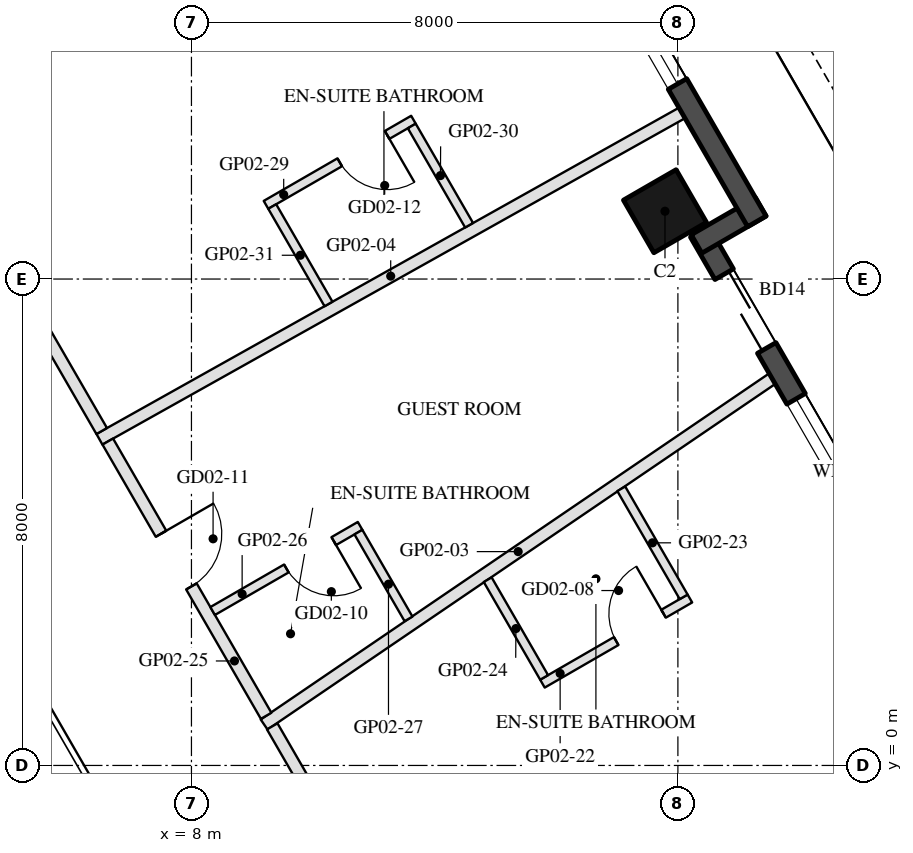
"""IFC4 building model, lengths in metres.
Left out: names, types, materials, properties, quantities, classifications, styles, units other than length and angle.
Written with IfcOpenShell. Run it as: python <this file> out.ifc"""

import sys

from ifc_helpers import new_model, si_unit, direction, frame, frame_2d, origin, origin_2d, place, context, subcontext, project, spatial, rectangle, hollow_rectangle, extrude, element, fill, save


model = new_model("IFC4")
c1 = context("Model", 3, precision=1e-05, world=origin(), true_north=direction((0.0, 1.0)))
c2 = subcontext(c1, "Body", "Model", "MODEL_VIEW")
j1 = project(units=[si_unit("LENGTHUNIT", "METRE"), si_unit("PLANEANGLEUNIT", "RADIAN")], contexts=[c1])
p1 = place(None, origin())
s1 = spatial("IfcSite", under=j1, at=p1, CompositionType="ELEMENT")
p2 = place(p1, origin())
s2 = spatial("IfcBuilding", under=s1, at=p2, CompositionType="ELEMENT")
p3 = place(p2, frame((0.0, 0.0, 53.9)))
s3 = spatial("IfcBuildingStorey", under=s2, at=p3, CompositionType="ELEMENT", Elevation=53.9)
p4 = place(p3, frame((15.788, 9.115, 0.0), z_axis=(0.0, 0.0, 1.0), x_axis=(-0.5, 0.866025403784, 0.0)))
e1 = element("IfcColumn", 1, at=p4, inside=s3, PredefinedType="COLUMN", context=c2, shape_type="SweptSolid", body=[
    extrude(hollow_rectangle(XDim=1.0, YDim=1.0, WallThickness=0.045, at=origin_2d()), origin(), (0.0, 0.0, 1.0), 3.7),
])
p5 = place(p3, frame((19.729, 2.938, 0.0), z_axis=(0.0, 0.0, 1.0), x_axis=(-0.499976430342, 0.866039011305, 0.0)))
e2 = element("IfcWall", 2, at=p5, inside=s3, PredefinedType="SOLIDWALL", context=c2, shape_type="SweptSolid", body=[
    extrude(rectangle(XDim=6.74, YDim=0.35, at=frame_2d((3.37, 0.0))), origin(), (0.0, 0.0, 1.0), 3.55),
])
p6 = place(p5, frame((0.77, 0.0, 0.3)))
e3 = element("IfcOpeningElement", 3, at=p6, cuts=e2, PredefinedType="OPENING", context=c2, shape_type="SweptSolid", body=[
    extrude(rectangle(XDim=2.8, YDim=2.65, at=frame_2d((1.4, 1.325))), frame((0.0, 0.185, 0.0), z_axis=(0.0, -1.0, 0.0), x_axis=(1.0, 0.0, 0.0)), (0.0, 0.0, 1.0), 0.37),
])
p7 = place(p5, frame((4.536, 0.0, 0.0)))
e4 = element("IfcOpeningElement", 4, at=p7, cuts=e2, PredefinedType="OPENING", context=c2, shape_type="SweptSolid", body=[
    extrude(rectangle(XDim=1.4, YDim=2.4, at=frame_2d((0.7, 1.2))), frame((0.0, 0.185, 0.0), z_axis=(0.0, -1.0, 0.0), x_axis=(1.0, 0.0, 0.0)), (0.0, 0.0, 1.0), 0.37),
])
p8 = place(p3, frame((16.306, 8.577, 0.0), z_axis=(0.0, 0.0, 1.0), x_axis=(0.866092288191, 0.499884134912, 0.0)))
e5 = element("IfcWall", 5, at=p8, inside=s3, PredefinedType="SOLIDWALL", context=c2, shape_type="SweptSolid", body=[
    extrude(rectangle(XDim=1.22, YDim=0.35, at=frame_2d((0.61, 0.0))), origin(), (0.0, 0.0, 1.0), 3.55),
])
p9 = place(p3, frame((17.299, 8.948, 0.0), z_axis=(0.0, 0.0, 1.0), x_axis=(-0.500010041276, 0.866019606374, 0.0)))
e6 = element("IfcWall", 6, at=p9, inside=s3, PredefinedType="SOLIDWALL", context=c2, shape_type="SweptSolid", body=[
    extrude(rectangle(XDim=9.7, YDim=0.35, at=frame_2d((4.85, 0.0))), origin(), (0.0, 0.0, 1.0), 3.55),
])
p10 = place(p9, frame((2.61, 0.0, 0.3)))
e7 = element("IfcOpeningElement", 7, at=p10, cuts=e6, PredefinedType="OPENING", context=c2, shape_type="SweptSolid", body=[
    extrude(rectangle(XDim=1.6, YDim=2.65, at=frame_2d((0.8, 1.325))), frame((0.0, 0.185, 0.0), z_axis=(0.0, -1.0, 0.0), x_axis=(1.0, 0.0, 0.0)), (0.0, 0.0, 1.0), 0.37),
])
p11 = place(p9, frame((4.949, 0.0, 0.3)))
e8 = element("IfcOpeningElement", 8, at=p11, cuts=e6, PredefinedType="OPENING", context=c2, shape_type="SweptSolid", body=[
    extrude(rectangle(XDim=3.0, YDim=2.65, at=frame_2d((1.5, 1.325))), frame((0.0, 0.185, 0.0), z_axis=(0.0, -1.0, 0.0), x_axis=(1.0, 0.0, 0.0)), (0.0, 0.0, 1.0), 0.37),
])
p12 = place(p3, frame((17.551, 6.361, 0.0), z_axis=(0.0, 0.0, 1.0), x_axis=(-0.826656859261, -0.562706350627, 0.0)))
e9 = element("IfcWall", 9, at=p12, inside=s3, PredefinedType="PARTITIONING", context=c2, shape_type="SweptSolid", body=[
    extrude(rectangle(XDim=10.108, YDim=0.2, at=frame_2d((5.054, 0.0))), origin(), (0.0, 0.0, 1.0), 2.95),
])
p13 = place(p3, frame((16.067, 10.731, 0.0), z_axis=(0.0, 0.0, 1.0), x_axis=(-0.872443451626, -0.488715074164, 0.0)))
e10 = element("IfcWall", 10, at=p13, inside=s3, PredefinedType="PARTITIONING", context=c2, shape_type="SweptSolid", body=[
    extrude(rectangle(XDim=10.981, YDim=0.2, at=frame_2d((5.49, 0.0))), origin(), (0.0, 0.0, 1.0), 2.96),
])
p14 = place(p3, frame((9.329, 0.643, 0.0), z_axis=(0.0, 0.0, 1.0), x_axis=(0.500001579811, -0.866024491678, 0.0)))
e11 = element("IfcWall", 11, at=p14, inside=s3, PredefinedType="PARTITIONING", context=c2, shape_type="SweptSolid", body=[
    extrude(rectangle(XDim=5.88, YDim=0.2, at=frame_2d((2.94, 0.0))), origin(), (0.0, 0.0, 1.0), 2.95),
])
p15 = place(p14, frame((2.44, 0.0, 0.0)))
e12 = element("IfcOpeningElement", 12, at=p15, cuts=e11, PredefinedType="OPENING", context=c2, shape_type="SweptSolid", body=[
    extrude(rectangle(XDim=1.0, YDim=2.1, at=frame_2d((0.5, 1.05))), frame((0.0, 0.11, 0.0), z_axis=(0.0, -1.0, 0.0), x_axis=(1.0, 0.0, 0.0)), (0.0, 0.0, 1.0), 0.22),
])
p16 = place(p3, frame((13.772, 1.345, 0.0), z_axis=(0.0, 0.0, 1.0), x_axis=(0.865996816683, 0.500049511043, 0.0)))
e13 = element("IfcWall", 13, at=p16, inside=s3, PredefinedType="PARTITIONING", context=c2, shape_type="SweptSolid", body=[
    extrude(rectangle(XDim=2.8, YDim=0.15, at=frame_2d((1.4, 0.0))), origin(), (0.0, 0.0, 1.0), 3.55),
])
p17 = place(p16, frame((1.4, 0.0, 0.0)))
e14 = element("IfcOpeningElement", 14, at=p17, cuts=e13, PredefinedType="OPENING", context=c2, shape_type="SweptSolid", body=[
    extrude(rectangle(XDim=0.9, YDim=2.1, at=frame_2d((0.45, 1.05))), frame((0.0, 0.085, 0.0), z_axis=(0.0, -1.0, 0.0), x_axis=(1.0, 0.0, 0.0)), (0.0, 0.0, 1.0), 0.17),
])
p18 = place(p3, frame((16.095, 2.773, 0.0), z_axis=(0.0, 0.0, 1.0), x_axis=(-0.499990189338, 0.866031067899, 0.0)))
e15 = element("IfcWall", 15, at=p18, inside=s3, PredefinedType="PARTITIONING", context=c2, shape_type="SweptSolid", body=[
    extrude(rectangle(XDim=2.052, YDim=0.15, at=frame_2d((1.026, 0.0))), origin(), (0.0, 0.0, 1.0), 2.95),
])
p19 = place(p3, frame((13.8, 1.448, 0.0), z_axis=(0.0, 0.0, 1.0), x_axis=(-0.499988210251, 0.866032210492, 0.0)))
e16 = element("IfcWall", 16, at=p19, inside=s3, PredefinedType="PARTITIONING", context=c2, shape_type="SweptSolid", body=[
    extrude(rectangle(XDim=1.855, YDim=0.15, at=frame_2d((0.928, 0.0))), origin(), (0.0, 0.0, 1.0), 2.95),
])
p20 = place(p3, frame((6.624, 5.327, 0.0), z_axis=(0.0, 0.0, 1.0), x_axis=(0.500015953014, -0.866016193112, 0.0)))
e17 = element("IfcWall", 17, at=p20, inside=s3, PredefinedType="PARTITIONING", context=c2, shape_type="SweptSolid", body=[
    extrude(rectangle(XDim=5.208, YDim=0.2, at=frame_2d((2.604, 0.0))), origin(), (0.0, 0.0, 1.0), 2.95),
])
p21 = place(p20, frame((1.751, 0.0, 0.0)))
e18 = element("IfcOpeningElement", 18, at=p21, cuts=e17, PredefinedType="OPENING", context=c2, shape_type="SweptSolid", body=[
    extrude(rectangle(XDim=1.0, YDim=2.1, at=frame_2d((0.5, 1.05))), frame((0.0, 0.11, 0.0), z_axis=(0.0, -1.0, 0.0), x_axis=(1.0, 0.0, 0.0)), (0.0, 0.0, 1.0), 0.22),
])
p22 = place(p3, frame((10.773, 3.94, 0.0), z_axis=(0.0, 0.0, 1.0), x_axis=(-0.866034573852, -0.49998411664, 0.0)))
e19 = element("IfcWall", 19, at=p22, inside=s3, PredefinedType="PARTITIONING", context=c2, shape_type="SweptSolid", body=[
    extrude(rectangle(XDim=2.8, YDim=0.15, at=frame_2d((1.4, 0.0))), origin(), (0.0, 0.0, 1.0), 3.55),
])
p23 = place(p22, frame((0.5, 0.0, 0.0)))
e20 = element("IfcOpeningElement", 20, at=p23, cuts=e19, PredefinedType="OPENING", context=c2, shape_type="SweptSolid", body=[
    extrude(rectangle(XDim=0.9, YDim=2.1, at=frame_2d((0.45, 1.05))), frame((0.0, 0.085, 0.0), z_axis=(0.0, -1.0, 0.0), x_axis=(1.0, 0.0, 0.0)), (0.0, 0.0, 1.0), 0.17),
])
p24 = place(p3, frame((11.57, 2.41, 0.0), z_axis=(0.0, 0.0, 1.0), x_axis=(-0.499931951619, 0.866064687971, 0.0)))
e21 = element("IfcWall", 21, at=p24, inside=s3, PredefinedType="PARTITIONING", context=c2, shape_type="SweptSolid", body=[
    extrude(rectangle(XDim=1.648, YDim=0.15, at=frame_2d((0.824, 0.0))), origin(), (0.0, 0.0, 1.0), 3.55),
])
p25 = place(p3, frame((2.281, 12.85, 0.0), z_axis=(0.0, 0.0, 1.0), x_axis=(0.499997198377, -0.866027021296, 0.0)))
e22 = element("IfcWall", 22, at=p25, inside=s3, PredefinedType="PARTITIONING", context=c2, shape_type="SweptSolid", body=[
    extrude(rectangle(XDim=8.487, YDim=0.2, at=frame_2d((4.243, 0.0))), origin(), (0.0, 0.0, 1.0), 2.95),
])
p26 = place(p25, frame((3.743, 0.0, 0.0)))
e23 = element("IfcOpeningElement", 23, at=p26, cuts=e22, PredefinedType="OPENING", context=c2, shape_type="SweptSolid", body=[
    extrude(rectangle(XDim=1.0, YDim=2.1, at=frame_2d((0.5, 1.05))), frame((0.0, 0.11, 0.0), z_axis=(0.0, -1.0, 0.0), x_axis=(1.0, 0.0, 0.0)), (0.0, 0.0, 1.0), 0.22),
])
p27 = place(p3, frame((11.651, 10.62, 0.0), z_axis=(0.0, 0.0, 1.0), x_axis=(-0.865996816683, -0.500049511043, 0.0)))
e24 = element("IfcWall", 24, at=p27, inside=s3, PredefinedType="PARTITIONING", context=c2, shape_type="SweptSolid", body=[
    extrude(rectangle(XDim=2.8, YDim=0.15, at=frame_2d((1.4, 0.0))), origin(), (0.0, 0.0, 1.0), 3.55),
])
p28 = place(p27, frame((0.5, 0.0, 0.0)))
e25 = element("IfcOpeningElement", 25, at=p28, cuts=e24, PredefinedType="OPENING", context=c2, shape_type="SweptSolid", body=[
    extrude(rectangle(XDim=0.9, YDim=2.1, at=frame_2d((0.45, 1.05))), frame((0.0, 0.085, 0.0), z_axis=(0.0, -1.0, 0.0), x_axis=(1.0, 0.0, 0.0)), (0.0, 0.0, 1.0), 0.17),
])
p29 = place(p3, frame((12.566, 8.885, 0.0), z_axis=(0.0, 0.0, 1.0), x_axis=(-0.499969057507, 0.866043267704, 0.0)))
e26 = element("IfcWall", 26, at=p29, inside=s3, PredefinedType="PARTITIONING", context=c2, shape_type="SweptSolid", body=[
    extrude(rectangle(XDim=1.885, YDim=0.15, at=frame_2d((0.943, 0.0))), origin(), (0.0, 0.0, 1.0), 3.55),
])
p30 = place(p3, frame((10.254, 7.59, 0.0), z_axis=(0.0, 0.0, 1.0), x_axis=(-0.499912756669, 0.866075767886, 0.0)))
e27 = element("IfcWall", 27, at=p30, inside=s3, PredefinedType="PARTITIONING", context=c2, shape_type="SweptSolid", body=[
    extrude(rectangle(XDim=1.851, YDim=0.15, at=frame_2d((0.925, 0.0))), origin(), (0.0, 0.0, 1.0), 3.55),
])
p31 = place(p6, origin())
e28 = element("IfcWindow", 28, at=p31, inside=s3, PartitioningType="SINGLE_PANEL", PredefinedType="WINDOW", context=c2, shape_type="SweptSolid", body=[
    extrude(rectangle(XDim=2.8, YDim=2.65, at=frame_2d((1.4, 1.325))), frame((0.0, 0.03, 0.0), z_axis=(0.0, -1.0, 0.0), x_axis=(1.0, 0.0, 0.0)), (0.0, 0.0, 1.0), 0.06),
])
fill(e3, e28)
p32 = place(p7, frame((1.4, 0.0, 0.0), z_axis=(0.0, 0.0, 1.0), x_axis=(-1.0, 0.0, 0.0)))
e29 = element("IfcDoor", 29, at=p32, inside=s3, OperationType="SLIDING_TO_LEFT", PredefinedType="DOOR", context=c2, shape_type="SweptSolid", body=[
    extrude(rectangle(XDim=1.4, YDim=2.4, at=frame_2d((0.7, 1.2))), frame((0.0, 0.025, 0.0), z_axis=(0.0, -1.0, 0.0), x_axis=(1.0, 0.0, 0.0)), (0.0, 0.0, 1.0), 0.05),
])
fill(e4, e29)
p33 = place(p10, origin())
e30 = element("IfcWindow", 30, at=p33, inside=s3, PartitioningType="SINGLE_PANEL", PredefinedType="WINDOW", context=c2, shape_type="SweptSolid", body=[
    extrude(rectangle(XDim=1.6, YDim=2.65, at=frame_2d((0.8, 1.325))), frame((0.0, 0.03, 0.0), z_axis=(0.0, -1.0, 0.0), x_axis=(1.0, 0.0, 0.0)), (0.0, 0.0, 1.0), 0.06),
])
fill(e7, e30)
p34 = place(p17, origin())
e31 = element("IfcDoor", 31, at=p34, inside=s3, OperationType="SINGLE_SWING_RIGHT", PredefinedType="DOOR", context=c2, shape_type="SweptSolid", body=[
    extrude(rectangle(XDim=0.9, YDim=2.1, at=frame_2d((0.45, 1.05))), frame((0.0, 0.025, 0.0), z_axis=(0.0, -1.0, 0.0), x_axis=(1.0, 0.0, 0.0)), (0.0, 0.0, 1.0), 0.05),
])
fill(e14, e31)
p35 = place(p23, origin())
e32 = element("IfcDoor", 32, at=p35, inside=s3, OperationType="SINGLE_SWING_LEFT", PredefinedType="DOOR", context=c2, shape_type="SweptSolid", body=[
    extrude(rectangle(XDim=0.9, YDim=2.1, at=frame_2d((0.45, 1.05))), frame((0.0, 0.025, 0.0), z_axis=(0.0, -1.0, 0.0), x_axis=(1.0, 0.0, 0.0)), (0.0, 0.0, 1.0), 0.05),
])
fill(e20, e32)
p36 = place(p21, origin())
e33 = element("IfcDoor", 33, at=p36, inside=s3, OperationType="SINGLE_SWING_LEFT", PredefinedType="DOOR", context=c2, shape_type="SweptSolid", body=[
    extrude(rectangle(XDim=1.0, YDim=2.1, at=frame_2d((0.5, 1.05))), frame((0.0, 0.025, 0.0), z_axis=(0.0, -1.0, 0.0), x_axis=(1.0, 0.0, 0.0)), (0.0, 0.0, 1.0), 0.05),
])
fill(e18, e33)
p37 = place(p28, origin())
e34 = element("IfcDoor", 34, at=p37, inside=s3, OperationType="SINGLE_SWING_LEFT", PredefinedType="DOOR", context=c2, shape_type="SweptSolid", body=[
    extrude(rectangle(XDim=0.9, YDim=2.1, at=frame_2d((0.45, 1.05))), frame((0.0, 0.025, 0.0), z_axis=(0.0, -1.0, 0.0), x_axis=(1.0, 0.0, 0.0)), (0.0, 0.0, 1.0), 0.05),
])
fill(e25, e34)
save(model, sys.argv[1])
